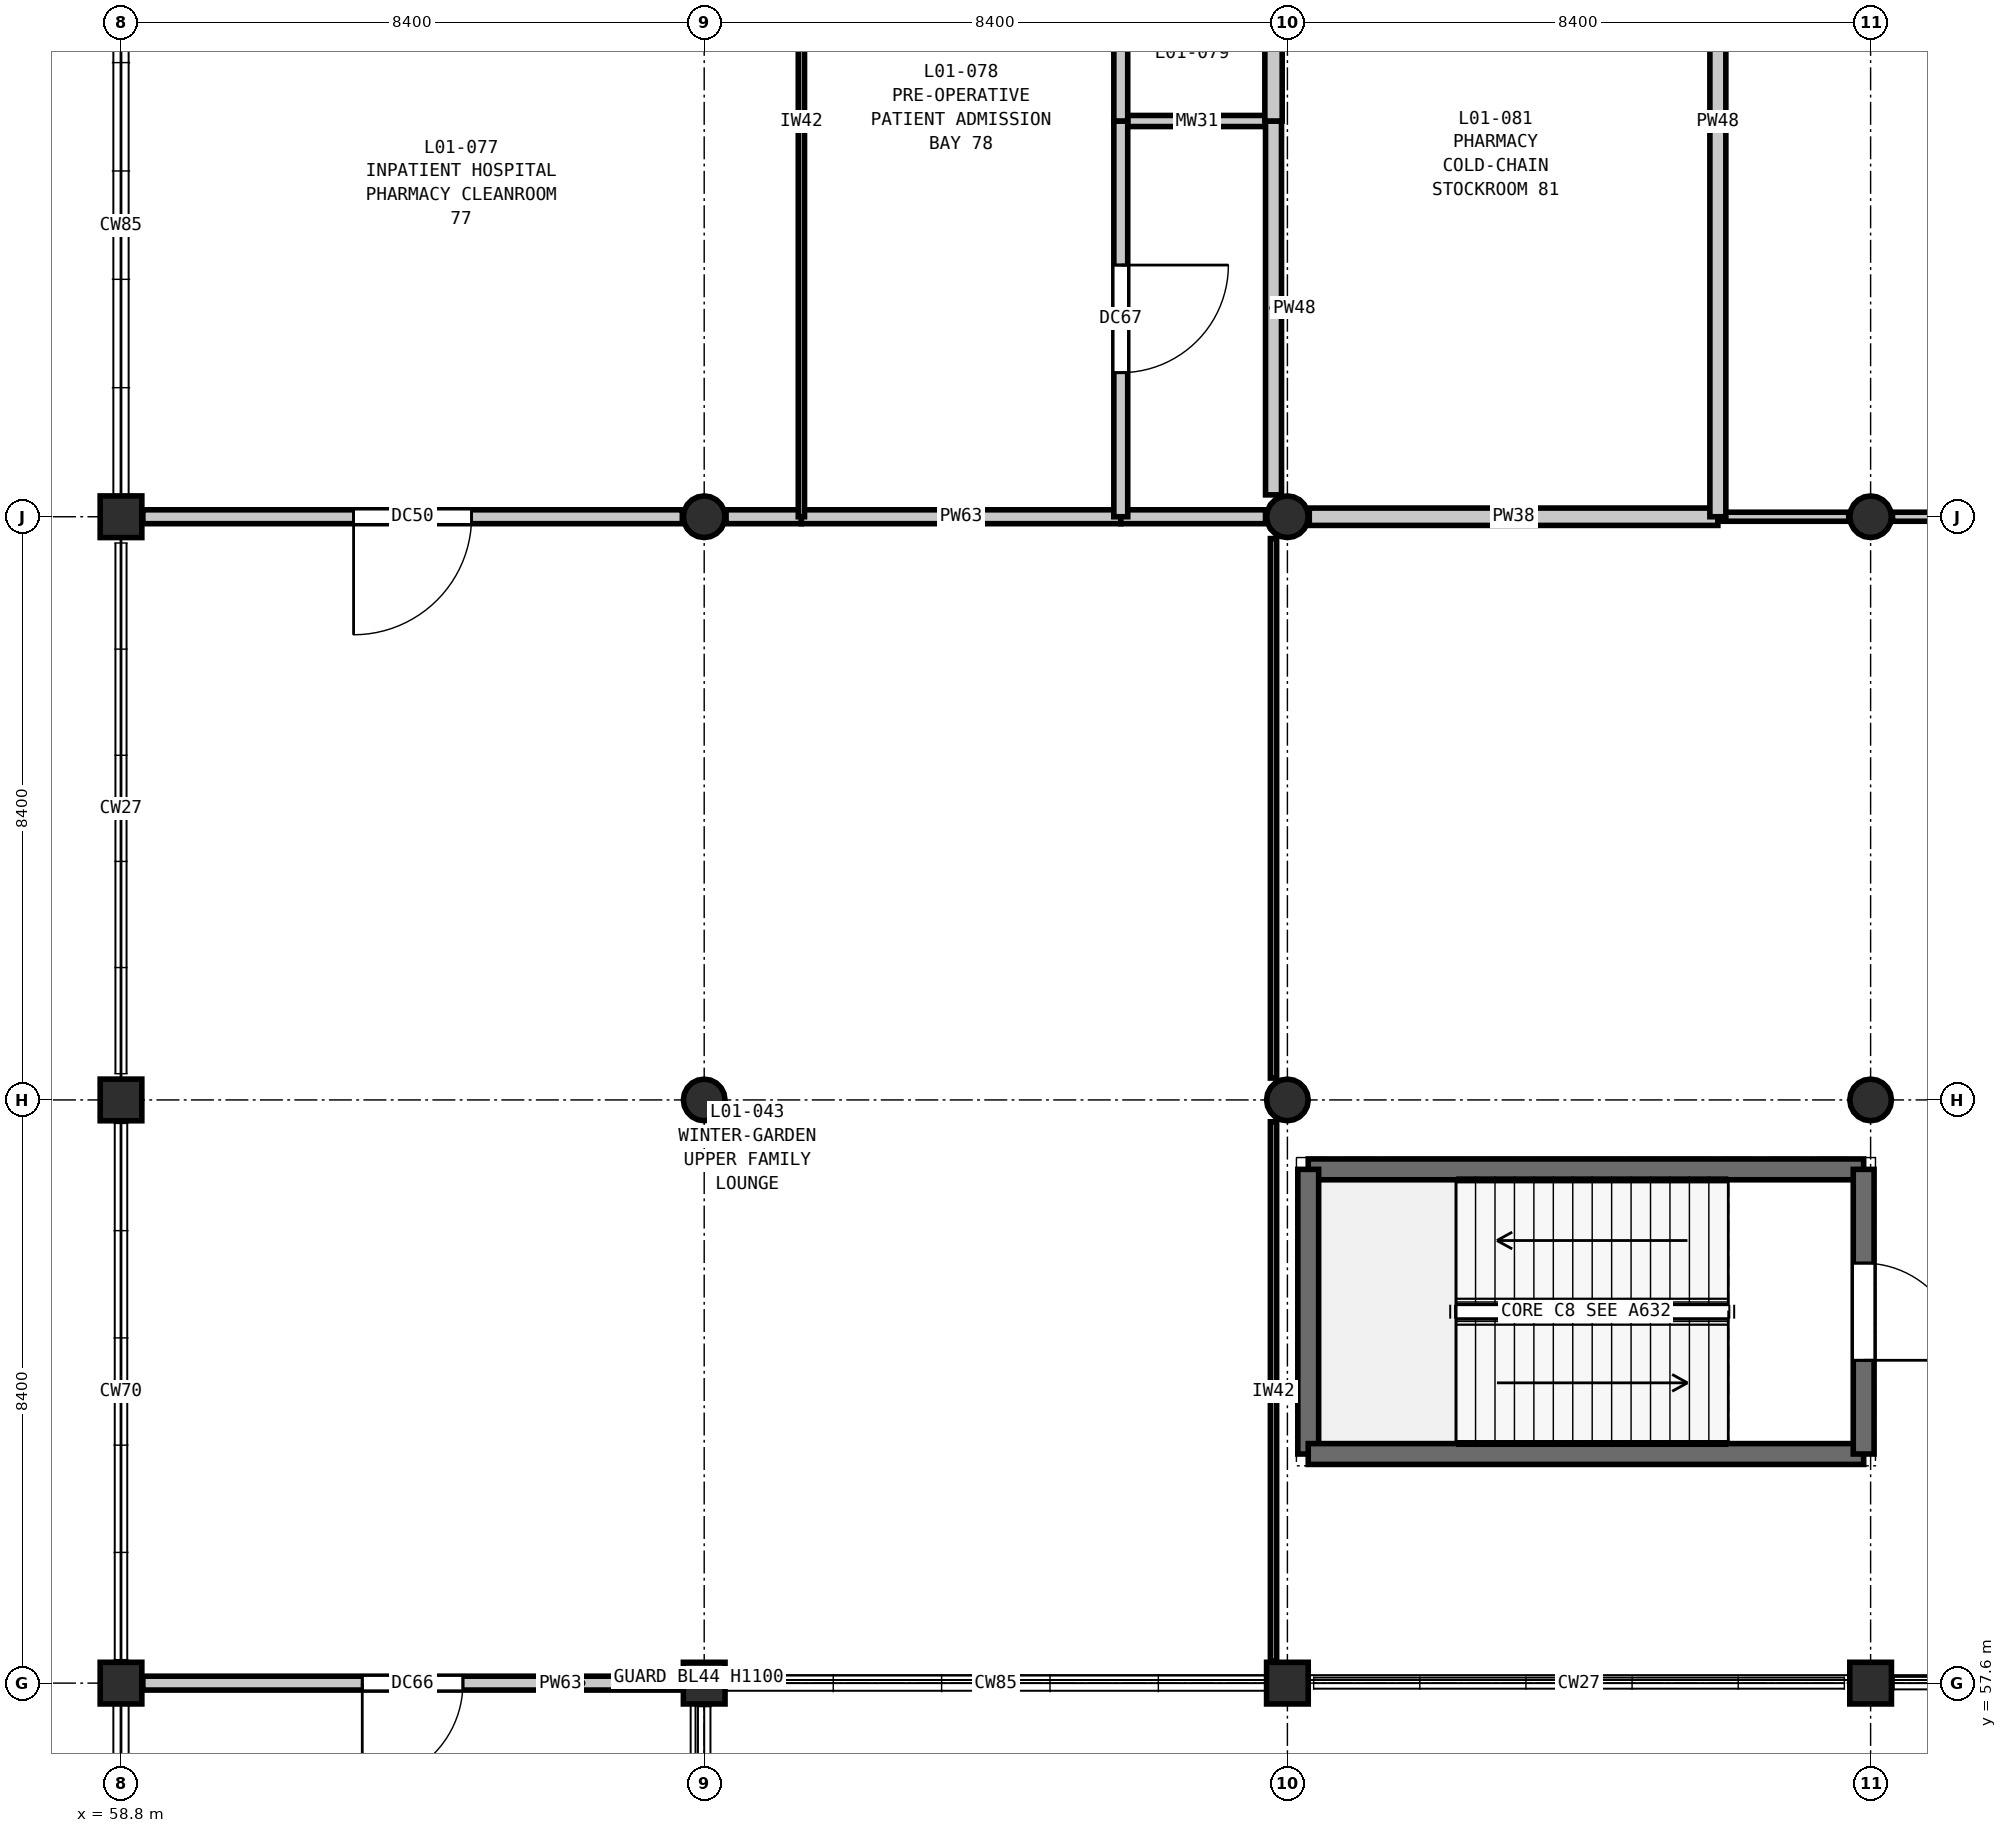
"""IFC4 building model, lengths in metres.
Left out: names, types, materials, properties, quantities, classifications, styles, units other than length and angle.
Written with IfcOpenShell. Run it as: python <this file> out.ifc"""

import sys

from ifc_helpers import new_model, si_unit, direction, frame, frame_2d, origin, origin_2d, place, context, subcontext, project, spatial, rectangle, circle, extrude, element, fill, save


model = new_model("IFC4")
c1 = context("Model", 3, precision=1e-05, world=origin(), true_north=direction((0.0, 1.0)))
c2 = subcontext(c1, "Body", "Model", "MODEL_VIEW")
j1 = project(units=[si_unit("LENGTHUNIT", "METRE"), si_unit("PLANEANGLEUNIT", "RADIAN")], contexts=[c1])
p1 = place(None, origin())
s1 = spatial("IfcSite", under=j1, at=p1, CompositionType="ELEMENT")
p2 = place(p1, origin())
s2 = spatial("IfcBuilding", under=s1, at=p2, CompositionType="ELEMENT")
p3 = place(p2, frame((0.0, 0.0, 5.4)))
s3 = spatial("IfcBuildingStorey", under=s2, at=p3, CompositionType="ELEMENT", Elevation=5.4)
for number, where, z_axis, x_axis in (
    (1, (58.8, 57.6, 0.0), (0.0, 0.0, 1.0), (1.0, 0.0, 0.0)),
    (2, (58.8, 66.0, 0.0), (0.0, 0.0, 1.0), (1.0, 0.0, 0.0)),
    (3, (58.8, 74.4, 0.0), (0.0, 0.0, 1.0), (1.0, 0.0, 0.0)),
    (4, (67.2, 57.6, 0.0), (0.0, 0.0, 1.0), (1.0, 0.0, 0.0)),
):
    element("IfcColumn", number, at=place(p3, frame(where, z_axis=z_axis, x_axis=x_axis)), inside=s3, PredefinedType="COLUMN", context=c2, shape_type="SweptSolid", body=[
        extrude(rectangle(XDim=0.6, YDim=0.6, at=origin_2d()), origin(), (0.0, 0.0, 1.0), 5.4),
    ])
for number, where, z_axis, x_axis in (
    (5, (67.2, 66.0, 0.0), (0.0, 0.0, 1.0), (1.0, 0.0, 0.0)),
    (6, (67.2, 74.4, 0.0), (0.0, 0.0, 1.0), (1.0, 0.0, 0.0)),
):
    element("IfcColumn", number, at=place(p3, frame(where, z_axis=z_axis, x_axis=x_axis)), inside=s3, PredefinedType="COLUMN", context=c2, shape_type="SweptSolid", body=[
        extrude(circle(Radius=0.3, at=origin_2d()), origin(), (0.0, 0.0, 1.0), 5.4),
    ])
p4 = place(p3, frame((75.6, 57.6, 0.0), z_axis=(0.0, 0.0, 1.0), x_axis=(1.0, 0.0, 0.0)))
e7 = element("IfcColumn", 7, at=p4, inside=s3, PredefinedType="COLUMN", context=c2, shape_type="SweptSolid", body=[
    extrude(rectangle(XDim=0.6, YDim=0.6, at=origin_2d()), origin(), (0.0, 0.0, 1.0), 5.4),
])
for number, where, z_axis, x_axis in (
    (8, (75.6, 66.0, 0.0), (0.0, 0.0, 1.0), (1.0, 0.0, 0.0)),
    (9, (75.6, 74.4, 0.0), (0.0, 0.0, 1.0), (1.0, 0.0, 0.0)),
):
    element("IfcColumn", number, at=place(p3, frame(where, z_axis=z_axis, x_axis=x_axis)), inside=s3, PredefinedType="COLUMN", context=c2, shape_type="SweptSolid", body=[
        extrude(circle(Radius=0.3, at=origin_2d()), origin(), (0.0, 0.0, 1.0), 5.4),
    ])
p5 = place(p3, frame((84.0, 57.6, 0.0), z_axis=(0.0, 0.0, 1.0), x_axis=(1.0, 0.0, 0.0)))
e10 = element("IfcColumn", 10, at=p5, inside=s3, PredefinedType="COLUMN", context=c2, shape_type="SweptSolid", body=[
    extrude(rectangle(XDim=0.6, YDim=0.6, at=origin_2d()), origin(), (0.0, 0.0, 1.0), 5.4),
])
for number, where, z_axis, x_axis in (
    (11, (84.0, 66.0, 0.0), (0.0, 0.0, 1.0), (1.0, 0.0, 0.0)),
    (12, (84.0, 74.4, 0.0), (0.0, 0.0, 1.0), (1.0, 0.0, 0.0)),
):
    element("IfcColumn", number, at=place(p3, frame(where, z_axis=z_axis, x_axis=x_axis)), inside=s3, PredefinedType="COLUMN", context=c2, shape_type="SweptSolid", body=[
        extrude(circle(Radius=0.3, at=origin_2d()), origin(), (0.0, 0.0, 1.0), 5.4),
    ])
p6 = place(p3, frame((83.9, 65.0, 0.0), z_axis=(0.0, 0.0, 1.0), x_axis=(-1.0, 0.0, 0.0)))
e13 = element("IfcWall", 13, at=p6, inside=s3, PredefinedType="SHEAR", context=c2, shape_type="SweptSolid", body=[
    extrude(rectangle(XDim=8.0, YDim=0.3, at=frame_2d((4.0, 0.0))), origin(), (0.0, 0.0, 1.0), 5.4),
])
p7 = place(p3, frame((75.9, 65.0, 0.0), z_axis=(0.0, 0.0, 1.0), x_axis=(0.0, -1.0, 0.0)))
e14 = element("IfcWall", 14, at=p7, inside=s3, PredefinedType="SHEAR", context=c2, shape_type="SweptSolid", body=[
    extrude(rectangle(XDim=4.1, YDim=0.3, at=frame_2d((2.05, 0.0))), origin(), (0.0, 0.0, 1.0), 5.4),
])
p8 = place(p3, frame((75.9, 60.9, 0.0), z_axis=(0.0, 0.0, 1.0), x_axis=(1.0, 0.0, 0.0)))
e15 = element("IfcWall", 15, at=p8, inside=s3, PredefinedType="SHEAR", context=c2, shape_type="SweptSolid", body=[
    extrude(rectangle(XDim=8.0, YDim=0.3, at=frame_2d((4.0, 0.0))), origin(), (0.0, 0.0, 1.0), 5.4),
])
p9 = place(p3, frame((83.9, 60.9, 0.0), z_axis=(0.0, 0.0, 1.0), x_axis=(0.0, 1.0, 0.0)))
e16 = element("IfcWall", 16, at=p9, inside=s3, PredefinedType="SHEAR", context=c2, shape_type="SweptSolid", body=[
    extrude(rectangle(XDim=4.1, YDim=0.3, at=frame_2d((2.05, 0.0))), origin(), (0.0, 0.0, 1.0), 5.4),
])
p10 = place(p9, frame((1.35, 0.0, 0.0)))
e17 = element("IfcOpeningElement", 17, at=p10, cuts=e16, PredefinedType="OPENING", context=c2, shape_type="SweptSolid", body=[
    extrude(rectangle(XDim=1.4, YDim=2.2, at=frame_2d((0.7, 1.1))), frame((0.0, 0.16, 0.0), z_axis=(0.0, -1.0, 0.0), x_axis=(1.0, 0.0, 0.0)), (0.0, 0.0, 1.0), 0.32),
])
p11 = place(p3, frame((59.115, 57.6, 0.0), z_axis=(0.0, 0.0, 1.0), x_axis=(1.0, 0.0, 0.0)))
e18 = element("IfcWall", 18, at=p11, inside=s3, PredefinedType="PARTITIONING", context=c2, shape_type="SweptSolid", body=[
    extrude(rectangle(XDim=7.77, YDim=0.2, at=frame_2d((3.885, 0.0))), origin(), (0.0, 0.0, 1.0), 4.685),
])
p12 = place(p11, frame((3.16, 0.0, 0.0)))
e19 = element("IfcOpeningElement", 19, at=p12, cuts=e18, PredefinedType="OPENING", context=c2, shape_type="SweptSolid", body=[
    extrude(rectangle(XDim=1.45, YDim=2.25, at=frame_2d((0.725, 1.125))), frame((0.0, 0.11, 0.0), z_axis=(0.0, -1.0, 0.0), x_axis=(1.0, 0.0, 0.0)), (0.0, 0.0, 1.0), 0.22),
])
p13 = place(p3, frame((59.115, 74.4, 0.0), z_axis=(0.0, 0.0, 1.0), x_axis=(1.0, 0.0, 0.0)))
e20 = element("IfcWall", 20, at=p13, inside=s3, PredefinedType="PARTITIONING", context=c2, shape_type="SweptSolid", body=[
    extrude(rectangle(XDim=7.77, YDim=0.2, at=frame_2d((3.885, 0.0))), origin(), (0.0, 0.0, 1.0), 4.685),
])
p14 = place(p13, frame((3.035, 0.0, 0.0)))
e21 = element("IfcOpeningElement", 21, at=p14, cuts=e20, PredefinedType="OPENING", context=c2, shape_type="SweptSolid", body=[
    extrude(rectangle(XDim=1.7, YDim=2.3, at=frame_2d((0.85, 1.15))), frame((0.0, 0.11, 0.0), z_axis=(0.0, -1.0, 0.0), x_axis=(1.0, 0.0, 0.0)), (0.0, 0.0, 1.0), 0.22),
])
p15 = place(p3, frame((67.515, 74.4, 0.0), z_axis=(0.0, 0.0, 1.0), x_axis=(1.0, 0.0, 0.0)))
e22 = element("IfcWall", 22, at=p15, inside=s3, PredefinedType="PARTITIONING", context=c2, shape_type="SweptSolid", body=[
    extrude(rectangle(XDim=1.085, YDim=0.2, at=frame_2d((0.542, 0.0))), origin(), (0.0, 0.0, 1.0), 4.685),
])
p16 = place(p3, frame((68.6, 74.4, 0.0), z_axis=(0.0, 0.0, 1.0), x_axis=(1.0, 0.0, 0.0)))
e23 = element("IfcWall", 23, at=p16, inside=s3, PredefinedType="PARTITIONING", context=c2, shape_type="SweptSolid", body=[
    extrude(rectangle(XDim=4.6, YDim=0.2, at=frame_2d((2.3, 0.0))), origin(), (0.0, 0.0, 1.0), 4.685),
])
p17 = place(p3, frame((73.2, 74.4, 0.0), z_axis=(0.0, 0.0, 1.0), x_axis=(1.0, 0.0, 0.0)))
e24 = element("IfcWall", 24, at=p17, inside=s3, PredefinedType="PARTITIONING", context=c2, shape_type="SweptSolid", body=[
    extrude(rectangle(XDim=2.085, YDim=0.2, at=frame_2d((1.042, 0.0))), origin(), (0.0, 0.0, 1.0), 4.685),
])
p18 = place(p3, frame((75.915, 74.4, 0.0), z_axis=(0.0, 0.0, 1.0), x_axis=(1.0, 0.0, 0.0)))
e25 = element("IfcWall", 25, at=p18, inside=s3, PredefinedType="PARTITIONING", context=c2, shape_type="SweptSolid", body=[
    extrude(rectangle(XDim=5.885, YDim=0.25, at=frame_2d((2.942, 0.0))), origin(), (0.0, 0.0, 1.0), 4.685),
])
p19 = place(p3, frame((84.315, 74.4, 0.0), z_axis=(0.0, 0.0, 1.0), x_axis=(1.0, 0.0, 0.0)))
e26 = element("IfcWall", 26, at=p19, inside=s3, PredefinedType="PARTITIONING", context=c2, shape_type="SweptSolid", body=[
    extrude(rectangle(XDim=7.285, YDim=0.13, at=frame_2d((3.643, 0.0))), origin(), (0.0, 0.0, 1.0), 4.685),
])
p20 = place(p3, frame((81.8, 74.4, 0.0), z_axis=(0.0, 0.0, 1.0), x_axis=(1.0, 0.0, 0.0)))
e27 = element("IfcWall", 27, at=p20, inside=s3, PredefinedType="PARTITIONING", context=c2, shape_type="SweptSolid", body=[
    extrude(rectangle(XDim=1.885, YDim=0.13, at=frame_2d((0.942, 0.0))), origin(), (0.0, 0.0, 1.0), 4.685),
])
p21 = place(p3, frame((73.2, 80.1, 0.0), z_axis=(0.0, 0.0, 1.0), x_axis=(1.0, 0.0, 0.0)))
e28 = element("IfcWall", 28, at=p21, inside=s3, PredefinedType="PLUMBINGWALL", context=c2, shape_type="SweptSolid", body=[
    extrude(rectangle(XDim=2.2, YDim=0.16, at=frame_2d((1.1, 0.0))), origin(), (0.0, 0.0, 1.0), 5.05),
])
p22 = place(p3, frame((68.6, 74.4, 0.0), z_axis=(0.0, 0.0, 1.0), x_axis=(0.0, 1.0, 0.0)))
e29 = element("IfcWall", 29, at=p22, inside=s3, PredefinedType="PARTITIONING", context=c2, shape_type="SweptSolid", body=[
    extrude(rectangle(XDim=11.4, YDim=0.09, at=frame_2d((5.7, 0.0))), origin(), (0.0, 0.0, 1.0), 5.05),
])
p23 = place(p3, frame((73.2, 74.4, 0.0), z_axis=(0.0, 0.0, 1.0), x_axis=(0.0, 1.0, 0.0)))
e30 = element("IfcWall", 30, at=p23, inside=s3, PredefinedType="PARTITIONING", context=c2, shape_type="SweptSolid", body=[
    extrude(rectangle(XDim=5.7, YDim=0.2, at=frame_2d((2.85, 0.0))), origin(), (0.0, 0.0, 1.0), 5.05),
])
p24 = place(p23, frame((2.075, 0.0, 0.0)))
e31 = element("IfcOpeningElement", 31, at=p24, cuts=e30, PredefinedType="OPENING", context=c2, shape_type="SweptSolid", body=[
    extrude(rectangle(XDim=1.55, YDim=2.25, at=frame_2d((0.775, 1.125))), frame((0.0, 0.11, 0.0), z_axis=(0.0, -1.0, 0.0), x_axis=(1.0, 0.0, 0.0)), (0.0, 0.0, 1.0), 0.22),
])
p25 = place(p3, frame((73.2, 80.1, 0.0), z_axis=(0.0, 0.0, 1.0), x_axis=(0.0, 1.0, 0.0)))
e32 = element("IfcWall", 32, at=p25, inside=s3, PredefinedType="PARTITIONING", context=c2, shape_type="SweptSolid", body=[
    extrude(rectangle(XDim=5.7, YDim=0.2, at=frame_2d((2.85, 0.0))), origin(), (0.0, 0.0, 1.0), 5.05),
])
p26 = place(p25, frame((2.39, 0.0, 0.0)))
e33 = element("IfcOpeningElement", 33, at=p26, cuts=e32, PredefinedType="OPENING", context=c2, shape_type="SweptSolid", body=[
    extrude(rectangle(XDim=0.92, YDim=2.1, at=frame_2d((0.46, 1.05))), frame((0.0, 0.11, 0.0), z_axis=(0.0, -1.0, 0.0), x_axis=(1.0, 0.0, 0.0)), (0.0, 0.0, 1.0), 0.22),
])
for number, where, z_axis, x_axis in (
    (34, (75.4, 57.915, 0.0), (0.0, 0.0, 1.0), (0.0, 1.0, 0.0)),
    (35, (75.4, 66.315, 0.0), (0.0, 0.0, 1.0), (0.0, 1.0, 0.0)),
):
    element("IfcWall", number, at=place(p3, frame(where, z_axis=z_axis, x_axis=x_axis)), inside=s3, PredefinedType="PARTITIONING", context=c2, shape_type="SweptSolid", body=[
        extrude(rectangle(XDim=7.77, YDim=0.09, at=frame_2d((3.885, 0.0))), origin(), (0.0, 0.0, 1.0), 4.735),
    ])
p27 = place(p3, frame((75.4, 74.715, 0.0), z_axis=(0.0, 0.0, 1.0), x_axis=(0.0, 1.0, 0.0)))
e36 = element("IfcWall", 36, at=p27, inside=s3, PredefinedType="PARTITIONING", context=c2, shape_type="SweptSolid", body=[
    extrude(rectangle(XDim=5.385, YDim=0.23, at=frame_2d((2.692, 0.0))), origin(), (0.0, 0.0, 1.0), 4.735),
])
p28 = place(p3, frame((75.4, 80.1, 0.0), z_axis=(0.0, 0.0, 1.0), x_axis=(0.0, 1.0, 0.0)))
e37 = element("IfcWall", 37, at=p28, inside=s3, PredefinedType="PARTITIONING", context=c2, shape_type="SweptSolid", body=[
    extrude(rectangle(XDim=2.385, YDim=0.25, at=frame_2d((1.192, 0.0))), origin(), (0.0, 0.0, 1.0), 4.735),
])
p29 = place(p3, frame((81.8, 74.4, 0.0), z_axis=(0.0, 0.0, 1.0), x_axis=(0.0, 1.0, 0.0)))
e38 = element("IfcWall", 38, at=p29, inside=s3, PredefinedType="PARTITIONING", context=c2, shape_type="SweptSolid", body=[
    extrude(rectangle(XDim=11.4, YDim=0.23, at=frame_2d((5.7, 0.0))), origin(), (0.0, 0.0, 1.0), 5.05),
])
p30 = place(p10, frame((1.4, 0.0, 0.0), z_axis=(0.0, 0.0, 1.0), x_axis=(-1.0, 0.0, 0.0)))
e39 = element("IfcDoor", 39, at=p30, inside=s3, OperationType="SINGLE_SWING_RIGHT", PredefinedType="DOOR", context=c2, shape_type="SweptSolid", body=[
    extrude(rectangle(XDim=1.4, YDim=2.2, at=frame_2d((0.7, 1.1))), frame((0.0, 0.025, 0.0), z_axis=(0.0, -1.0, 0.0), x_axis=(1.0, 0.0, 0.0)), (0.0, 0.0, 1.0), 0.05),
])
fill(e17, e39)
p31 = place(p12, frame((1.45, 0.0, 0.0), z_axis=(0.0, 0.0, 1.0), x_axis=(-1.0, 0.0, 0.0)))
e40 = element("IfcDoor", 40, at=p31, inside=s3, OperationType="SINGLE_SWING_RIGHT", PredefinedType="DOOR", context=c2, shape_type="SweptSolid", body=[
    extrude(rectangle(XDim=1.45, YDim=2.25, at=frame_2d((0.725, 1.125))), frame((0.0, 0.025, 0.0), z_axis=(0.0, -1.0, 0.0), x_axis=(1.0, 0.0, 0.0)), (0.0, 0.0, 1.0), 0.05),
])
fill(e19, e40)
p32 = place(p14, frame((1.7, 0.0, 0.0), z_axis=(0.0, 0.0, 1.0), x_axis=(-1.0, 0.0, 0.0)))
e41 = element("IfcDoor", 41, at=p32, inside=s3, OperationType="SINGLE_SWING_RIGHT", PredefinedType="DOOR", context=c2, shape_type="SweptSolid", body=[
    extrude(rectangle(XDim=1.7, YDim=2.3, at=frame_2d((0.85, 1.15))), frame((0.0, 0.025, 0.0), z_axis=(0.0, -1.0, 0.0), x_axis=(1.0, 0.0, 0.0)), (0.0, 0.0, 1.0), 0.05),
])
fill(e21, e41)
p33 = place(p24, frame((1.55, 0.0, 0.0), z_axis=(0.0, 0.0, 1.0), x_axis=(-1.0, 0.0, 0.0)))
e42 = element("IfcDoor", 42, at=p33, inside=s3, OperationType="SINGLE_SWING_LEFT", PredefinedType="DOOR", context=c2, shape_type="SweptSolid", body=[
    extrude(rectangle(XDim=1.55, YDim=2.25, at=frame_2d((0.775, 1.125))), frame((0.0, 0.025, 0.0), z_axis=(0.0, -1.0, 0.0), x_axis=(1.0, 0.0, 0.0)), (0.0, 0.0, 1.0), 0.05),
])
fill(e31, e42)
save(model, sys.argv[1])
